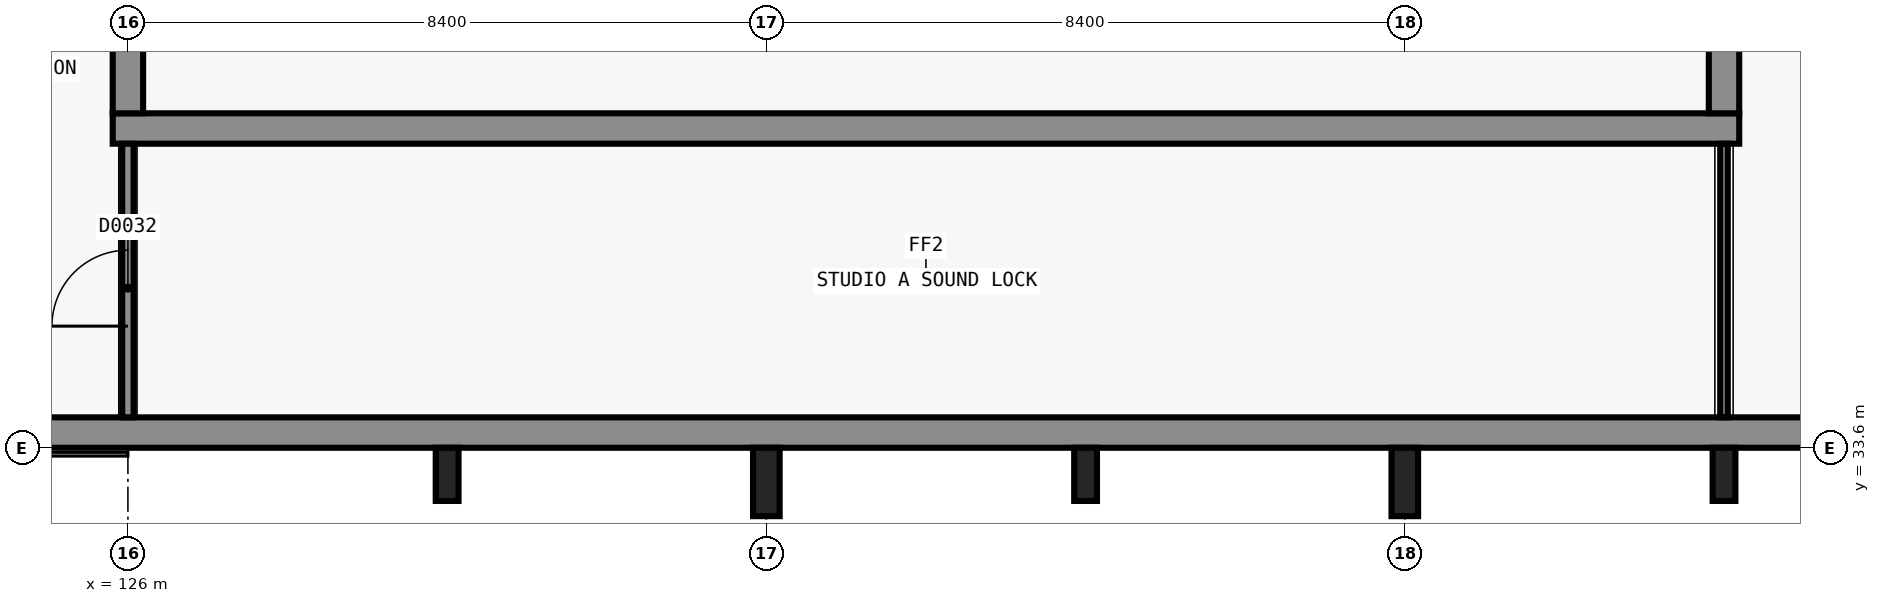
"""IFC4 building model, lengths in metres.
Left out: names, types, materials, properties, quantities, classifications, styles, units other than length and angle.
Written with IfcOpenShell. Run it as: python <this file> out.ifc"""

import sys

from ifc_helpers import new_model, si_unit, direction, frame, frame_2d, origin, origin_2d, place, context, subcontext, project, spatial, rectangle, extrude, element, fill, save


model = new_model("IFC4")
c1 = context("Model", 3, precision=1e-05, world=origin(), true_north=direction((0.0, 1.0)))
c2 = subcontext(c1, "Body", "Model", "MODEL_VIEW")
j1 = project(units=[si_unit("LENGTHUNIT", "METRE"), si_unit("PLANEANGLEUNIT", "RADIAN")], contexts=[c1])
p1 = place(None, origin())
s1 = spatial("IfcSite", under=j1, at=p1, CompositionType="ELEMENT")
p2 = place(p1, origin())
s2 = spatial("IfcBuilding", under=s1, at=p2, CompositionType="ELEMENT")
p3 = place(p2, origin())
s3 = spatial("IfcBuildingStorey", under=s2, at=p3, CompositionType="ELEMENT", Elevation=0.0)
p4 = place(p3, frame((147.2, 37.8, -0.3), z_axis=(0.0, 0.0, 1.0), x_axis=(-1.0, 0.0, 0.0)))
e1 = element("IfcWall", 1, at=p4, inside=s3, PredefinedType="SHEAR", context=c2, shape_type="SweptSolid", body=[
    extrude(rectangle(XDim=21.4, YDim=0.4, at=frame_2d((10.7, 0.0))), origin(), (0.0, 0.0, 1.0), 5.7),
])
p5 = place(p3, frame((126.0, 38.0, -0.3), z_axis=(0.0, 0.0, 1.0), x_axis=(0.0, 1.0, 0.0)))
e2 = element("IfcWall", 2, at=p5, inside=s3, PredefinedType="SHEAR", context=c2, shape_type="SweptSolid", body=[
    extrude(rectangle(XDim=28.8, YDim=0.4, at=frame_2d((14.4, 0.0))), origin(), (0.0, 0.0, 1.0), 5.7),
])
p6 = place(p5, frame((1.0, 0.0, 0.3)))
e3 = element("IfcOpeningElement", 3, at=p6, cuts=e2, PredefinedType="OPENING", context=c2, shape_type="SweptSolid", body=[
    extrude(rectangle(XDim=1.8, YDim=2.3, at=frame_2d((0.9, 1.15))), frame((0.0, 0.21, 0.0), z_axis=(0.0, -1.0, 0.0), x_axis=(1.0, 0.0, 0.0)), (0.0, 0.0, 1.0), 0.42),
])
p7 = place(p3, frame((147.0, 66.8, -0.3), z_axis=(0.0, 0.0, 1.0), x_axis=(0.0, -1.0, 0.0)))
e4 = element("IfcWall", 4, at=p7, inside=s3, PredefinedType="SHEAR", context=c2, shape_type="SweptSolid", body=[
    extrude(rectangle(XDim=28.8, YDim=0.4, at=frame_2d((14.4, 0.0))), origin(), (0.0, 0.0, 1.0), 5.7),
])
p8 = place(p3, frame((163.2, 33.8, -0.3), z_axis=(0.0, 0.0, 1.0), x_axis=(-1.0, 0.0, 0.0)))
e5 = element("IfcWall", 5, at=p8, inside=s3, PredefinedType="SHEAR", context=c2, shape_type="SweptSolid", body=[
    extrude(rectangle(XDim=40.8, YDim=0.4, at=frame_2d((20.4, 0.0))), origin(), (0.0, 0.0, 1.0), 5.7),
])
p9 = place(p8, frame((38.4, 0.0, 0.0)))
e6 = element("IfcOpeningElement", 6, at=p9, cuts=e5, PredefinedType="OPENING", context=c2, shape_type="SweptSolid", body=[
    extrude(rectangle(XDim=2.4, YDim=2.4, at=frame_2d((1.2, 1.2))), frame((0.0, 0.21, 0.0), z_axis=(0.0, -1.0, 0.0), x_axis=(1.0, 0.0, 0.0)), (0.0, 0.0, 1.0), 0.42),
])
p10 = place(p3, frame((130.2, 33.25, -0.3), z_axis=(0.0, 0.0, 1.0), x_axis=(1.0, 0.0, 0.0)))
e7 = element("IfcColumn", 7, at=p10, inside=s3, PredefinedType="PILASTER", context=c2, shape_type="SweptSolid", body=[
    extrude(rectangle(XDim=0.3, YDim=0.7, at=origin_2d()), origin(), (0.0, 0.0, 1.0), 5.7),
])
p11 = place(p3, frame((134.4, 33.15, -0.3), z_axis=(0.0, 0.0, 1.0), x_axis=(1.0, 0.0, 0.0)))
e8 = element("IfcColumn", 8, at=p11, inside=s3, PredefinedType="PILASTER", context=c2, shape_type="SweptSolid", body=[
    extrude(rectangle(XDim=0.35, YDim=0.9, at=origin_2d()), origin(), (0.0, 0.0, 1.0), 5.7),
])
p12 = place(p3, frame((138.6, 33.25, -0.3), z_axis=(0.0, 0.0, 1.0), x_axis=(1.0, 0.0, 0.0)))
e9 = element("IfcColumn", 9, at=p12, inside=s3, PredefinedType="PILASTER", context=c2, shape_type="SweptSolid", body=[
    extrude(rectangle(XDim=0.3, YDim=0.7, at=origin_2d()), origin(), (0.0, 0.0, 1.0), 5.7),
])
p13 = place(p3, frame((142.8, 33.15, -0.3), z_axis=(0.0, 0.0, 1.0), x_axis=(1.0, 0.0, 0.0)))
e10 = element("IfcColumn", 10, at=p13, inside=s3, PredefinedType="PILASTER", context=c2, shape_type="SweptSolid", body=[
    extrude(rectangle(XDim=0.35, YDim=0.9, at=origin_2d()), origin(), (0.0, 0.0, 1.0), 5.7),
])
p14 = place(p3, frame((147.0, 33.25, -0.3), z_axis=(0.0, 0.0, 1.0), x_axis=(1.0, 0.0, 0.0)))
e11 = element("IfcColumn", 11, at=p14, inside=s3, PredefinedType="PILASTER", context=c2, shape_type="SweptSolid", body=[
    extrude(rectangle(XDim=0.3, YDim=0.7, at=origin_2d()), origin(), (0.0, 0.0, 1.0), 5.7),
])
p15 = place(p3, frame((126.0, 34.0, 0.0), z_axis=(0.0, 0.0, 1.0), x_axis=(0.0, 1.0, 0.0)))
e12 = element("IfcWall", 12, at=p15, inside=s3, PredefinedType="PARTITIONING", context=c2, shape_type="SweptSolid", body=[
    extrude(rectangle(XDim=3.6, YDim=0.15, at=frame_2d((1.8, 0.0))), origin(), (0.0, 0.0, 1.0), 4.6),
])
p16 = place(p15, frame((1.2, 0.0, 0.0)))
e13 = element("IfcOpeningElement", 13, at=p16, cuts=e12, PredefinedType="OPENING", context=c2, shape_type="SweptSolid", body=[
    extrude(rectangle(XDim=1.0, YDim=2.1, at=frame_2d((0.5, 1.05))), frame((0.0, 0.085, 0.0), z_axis=(0.0, -1.0, 0.0), x_axis=(1.0, 0.0, 0.0)), (0.0, 0.0, 1.0), 0.17),
])
p17 = place(p3, frame((147.0, 34.0, 0.0), z_axis=(0.0, 0.0, 1.0), x_axis=(0.0, 1.0, 0.0)))
e14 = element("IfcWall", 14, at=p17, inside=s3, PredefinedType="PARTITIONING", context=c2, shape_type="SweptSolid", body=[
    extrude(rectangle(XDim=3.6, YDim=0.1, at=frame_2d((1.8, 0.0))), origin(), (0.0, 0.0, 1.0), 5.1),
])
p18 = place(p16, origin())
e15 = element("IfcDoor", 15, at=p18, inside=s3, OperationType="SINGLE_SWING_RIGHT", PredefinedType="DOOR", context=c2, shape_type="SweptSolid", body=[
    extrude(rectangle(XDim=1.0, YDim=2.1, at=frame_2d((0.5, 1.05))), frame((0.0, 0.025, 0.0), z_axis=(0.0, -1.0, 0.0), x_axis=(1.0, 0.0, 0.0)), (0.0, 0.0, 1.0), 0.05),
])
fill(e13, e15)
save(model, sys.argv[1])
